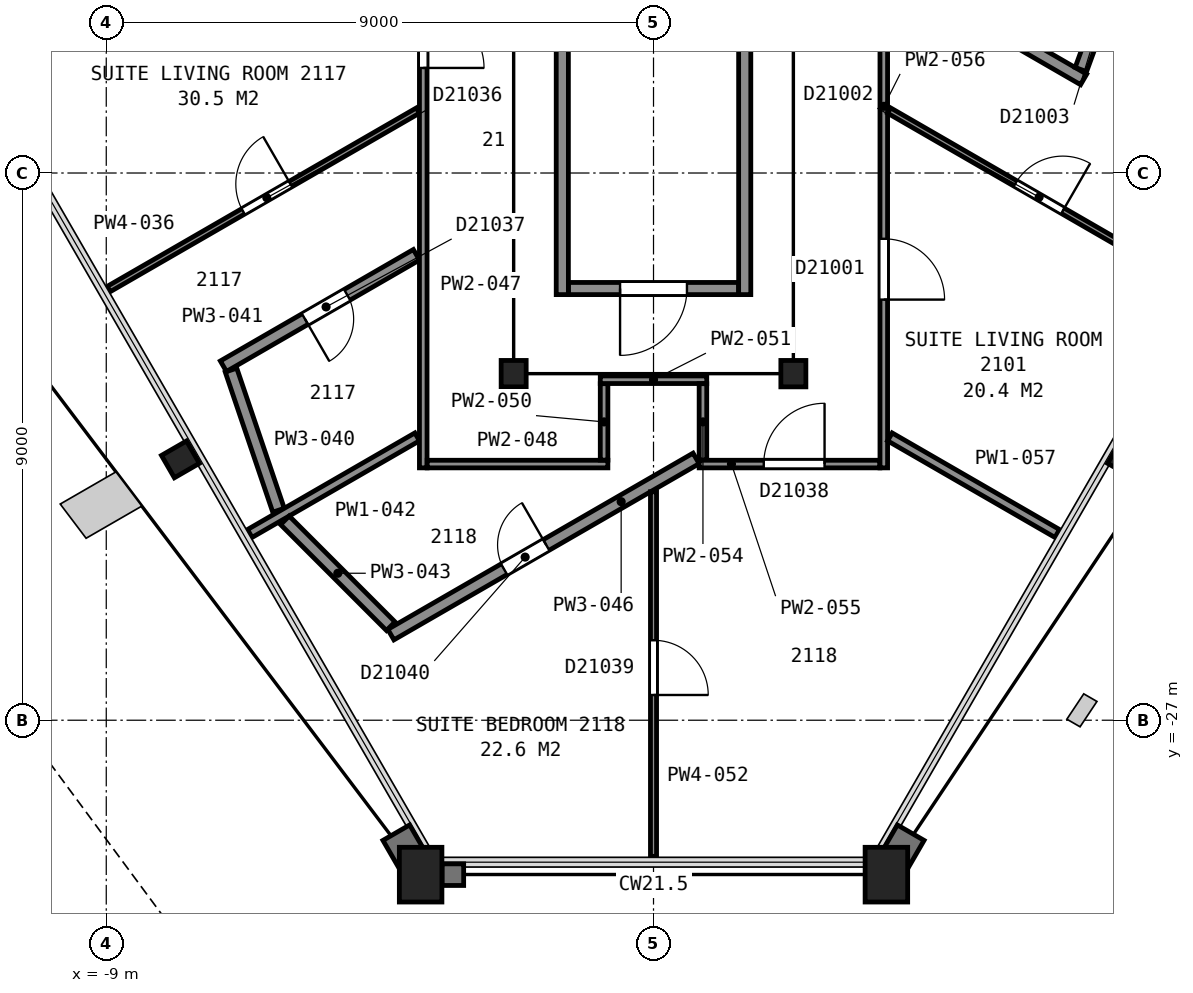
"""IFC4 building model, lengths in metres.
Left out: names, types, materials, properties, quantities, classifications, styles, units other than length and angle.
Written with IfcOpenShell. Run it as: python <this file> out.ifc"""

import sys

from ifc_helpers import new_model, si_unit, direction, frame, frame_2d, origin, origin_2d, place, context, subcontext, project, spatial, rectangle, hollow_rectangle, i_section, extrude, element, fill, save


model = new_model("IFC4")
c1 = context("Model", 3, precision=1e-05, world=origin(), true_north=direction((0.0, 1.0)))
c2 = subcontext(c1, "Body", "Model", "MODEL_VIEW")
j1 = project(units=[si_unit("LENGTHUNIT", "METRE"), si_unit("PLANEANGLEUNIT", "RADIAN")], contexts=[c1])
p1 = place(None, origin())
s1 = spatial("IfcSite", under=j1, at=p1, CompositionType="ELEMENT")
p2 = place(p1, origin())
s2 = spatial("IfcBuilding", under=s1, at=p2, CompositionType="ELEMENT")
p3 = place(p2, frame((0.0, 0.0, 92.8)))
s3 = spatial("IfcBuildingStorey", under=s2, at=p3, CompositionType="ELEMENT", Elevation=92.8)
p4 = place(p3, frame((-7.78, -22.71, 0.0), z_axis=(0.0, 0.0, 1.0), x_axis=(-0.5, 0.866025403784, 0.0)))
e1 = element("IfcColumn", 1, at=p4, inside=s3, PredefinedType="COLUMN", context=c2, shape_type="SweptSolid", body=[
    extrude(i_section(OverallWidth=0.424, OverallDepth=0.475, WebThickness=0.048, FlangeThickness=0.077, FilletRadius=0.015, at=origin_2d()), origin(), (0.0, 0.0, 1.0), 3.6),
])
for number, where, z_axis, x_axis in (
    (2, (-3.83, -29.54, 0.0), (0.0, 0.0, 1.0), (-1.0, 0.0, 0.0)),
    (3, (3.83, -29.54, 0.0), (0.0, 0.0, 1.0), (-1.0, 0.0, 0.0)),
):
    element("IfcColumn", number, at=place(p3, frame(where, z_axis=z_axis, x_axis=x_axis)), inside=s3, PredefinedType="COLUMN", context=c2, shape_type="SweptSolid", body=[
        extrude(hollow_rectangle(XDim=0.7, YDim=0.9, WallThickness=0.065, at=origin_2d()), origin(), (0.0, 0.0, 1.0), 3.6),
    ])
p5 = place(p3, frame((7.78, -22.71, 0.0), z_axis=(0.0, 0.0, 1.0), x_axis=(-0.5, -0.866025403784, 0.0)))
e4 = element("IfcColumn", 4, at=p5, inside=s3, PredefinedType="COLUMN", context=c2, shape_type="SweptSolid", body=[
    extrude(i_section(OverallWidth=0.424, OverallDepth=0.475, WebThickness=0.048, FlangeThickness=0.077, FilletRadius=0.015, at=origin_2d()), origin(), (0.0, 0.0, 1.0), 3.6),
])
for number, where, z_axis, x_axis in (
    (5, (-2.3, -21.3, 0.0), (0.0, 0.0, 1.0), (-1.0, 0.0, 0.0)),
    (6, (2.3, -21.3, 0.0), (0.0, 0.0, 1.0), (-1.0, 0.0, 0.0)),
):
    element("IfcColumn", number, at=place(p3, frame(where, z_axis=z_axis, x_axis=x_axis)), inside=s3, PredefinedType="COLUMN", context=c2, shape_type="SweptSolid", body=[
        extrude(i_section(OverallWidth=0.411, OverallDepth=0.434, WebThickness=0.036, FlangeThickness=0.057, FilletRadius=0.015, at=origin_2d()), origin(), (0.0, 0.0, 1.0), 3.6),
    ])
p6 = place(p3, frame((-1.4, -19.9, 0.0), z_axis=(0.0, 0.0, 1.0), x_axis=(1.0, 0.0, 0.0)))
e7 = element("IfcWall", 7, at=p6, inside=s3, PredefinedType="PARTITIONING", context=c2, shape_type="SweptSolid", body=[
    extrude(rectangle(XDim=2.8, YDim=0.2, at=frame_2d((1.4, 0.0))), origin(), (0.0, 0.0, 1.0), 3.35),
])
p7 = place(p6, frame((0.85, 0.0, 0.0)))
e8 = element("IfcOpeningElement", 8, at=p7, cuts=e7, PredefinedType="OPENING", context=c2, shape_type="SweptSolid", body=[
    extrude(rectangle(XDim=1.1, YDim=2.1, at=frame_2d((0.55, 1.05))), frame((0.0, 0.11, 0.0), z_axis=(0.0, -1.0, 0.0), x_axis=(1.0, 0.0, 0.0)), (0.0, 0.0, 1.0), 0.22),
])
for number, where, z_axis, x_axis in (
    (9, (1.5, -8.0, 0.0), (0.0, 0.0, 1.0), (0.0, -1.0, 0.0)),
    (10, (-1.5, -8.0, 0.0), (0.0, 0.0, 1.0), (0.0, -1.0, 0.0)),
):
    element("IfcWall", number, at=place(p3, frame(where, z_axis=z_axis, x_axis=x_axis)), inside=s3, PredefinedType="PARTITIONING", context=c2, shape_type="SweptSolid", body=[
        extrude(rectangle(XDim=12.0, YDim=0.2, at=frame_2d((6.0, 0.0))), origin(), (0.0, 0.0, 1.0), 3.35),
    ])
p8 = place(p3, frame((-3.875, -16.972, 0.0), z_axis=(0.0, 0.0, 1.0), x_axis=(-0.86602429061, -0.500001928069, 0.0)))
e11 = element("IfcWall", 11, at=p8, inside=s3, PredefinedType="PARTITIONING", context=c2, shape_type="SweptSolid", body=[
    extrude(rectangle(XDim=5.873, YDim=0.1, at=frame_2d((2.937, 0.0))), origin(), (0.0, 0.0, 1.0), 2.613),
])
p9 = place(p8, frame((2.419, 0.0, 0.0)))
e12 = element("IfcOpeningElement", 12, at=p9, cuts=e11, PredefinedType="OPENING", context=c2, shape_type="SweptSolid", body=[
    extrude(rectangle(XDim=0.9, YDim=2.1, at=frame_2d((0.45, 1.05))), frame((0.0, 0.06, 0.0), z_axis=(0.0, -1.0, 0.0), x_axis=(1.0, 0.0, 0.0)), (0.0, 0.0, 1.0), 0.12),
])
p10 = place(p3, frame((-6.948, -21.242, 0.0), z_axis=(0.0, 0.0, 1.0), x_axis=(0.321098754357, -0.947045716927, 0.0)))
e13 = element("IfcWall", 13, at=p10, inside=s3, PredefinedType="PARTITIONING", context=c2, shape_type="SweptSolid", body=[
    extrude(rectangle(XDim=2.434, YDim=0.2, at=frame_2d((1.217, 0.0))), origin(), (0.0, 0.0, 1.0), 2.613),
])
p11 = place(p3, frame((-3.899, -19.345, 0.0), z_axis=(0.0, 0.0, 1.0), x_axis=(-0.865971488458, -0.500093372459, 0.0)))
e14 = element("IfcWall", 14, at=p11, inside=s3, PredefinedType="PARTITIONING", context=c2, shape_type="SweptSolid", body=[
    extrude(rectangle(XDim=3.665, YDim=0.2, at=frame_2d((1.833, 0.0))), origin(), (0.0, 0.0, 1.0), 2.613),
])
p12 = place(p11, frame((1.315, 0.0, 0.0)))
e15 = element("IfcOpeningElement", 15, at=p12, cuts=e14, PredefinedType="OPENING", context=c2, shape_type="SweptSolid", body=[
    extrude(rectangle(XDim=0.8, YDim=2.1, at=frame_2d((0.4, 1.05))), frame((0.0, 0.11, 0.0), z_axis=(0.0, -1.0, 0.0), x_axis=(1.0, 0.0, 0.0)), (0.0, 0.0, 1.0), 0.22),
])
p13 = place(p3, frame((-6.64, -23.929, 0.0), z_axis=(0.0, 0.0, 1.0), x_axis=(0.866065365018, 0.499930778725, 0.0)))
e16 = element("IfcWall", 16, at=p13, inside=s3, PredefinedType="PARTITIONING", context=c2, shape_type="SweptSolid", body=[
    extrude(rectangle(XDim=3.179, YDim=0.15, at=frame_2d((1.589, 0.0))), origin(), (0.0, 0.0, 1.0), 2.613),
])
p14 = place(p3, frame((-6.062, -23.712, 0.0), z_axis=(0.0, 0.0, 1.0), x_axis=(0.706958057502, -0.707255473597, 0.0)))
e17 = element("IfcWall", 17, at=p14, inside=s3, PredefinedType="PARTITIONING", context=c2, shape_type="SweptSolid", body=[
    extrude(rectangle(XDim=2.463, YDim=0.2, at=frame_2d((1.231, 0.0))), origin(), (0.0, 0.0, 1.0), 2.613),
])
p15 = place(p3, frame((-4.32, -25.592, 0.0), z_axis=(0.0, 0.0, 1.0), x_axis=(0.86603408909, 0.499984956307, 0.0)))
e18 = element("IfcWall", 18, at=p15, inside=s3, PredefinedType="PARTITIONING", context=c2, shape_type="SweptSolid", body=[
    extrude(rectangle(XDim=5.797, YDim=0.2, at=frame_2d((2.898, 0.0))), origin(), (0.0, 0.0, 1.0), 2.613),
])
p16 = place(p15, frame((2.15, 0.0, 0.0)))
e19 = element("IfcOpeningElement", 19, at=p16, cuts=e18, PredefinedType="OPENING", context=c2, shape_type="SweptSolid", body=[
    extrude(rectangle(XDim=0.8, YDim=2.1, at=frame_2d((0.4, 1.05))), frame((0.0, 0.11, 0.0), z_axis=(0.0, -1.0, 0.0), x_axis=(1.0, 0.0, 0.0)), (0.0, 0.0, 1.0), 0.22),
])
p17 = place(p3, frame((-3.787, -22.85, 0.0), z_axis=(0.0, 0.0, 1.0), x_axis=(0.0, 1.0, 0.0)))
e20 = element("IfcWall", 20, at=p17, inside=s3, PredefinedType="PARTITIONING", context=c2, shape_type="SweptSolid", body=[
    extrude(rectangle(XDim=8.125, YDim=0.125, at=frame_2d((4.062, 0.0))), origin(), (0.0, 0.0, 1.0), 2.613),
])
p18 = place(p17, frame((6.577, 0.0, 0.0)))
e21 = element("IfcOpeningElement", 21, at=p18, cuts=e20, PredefinedType="OPENING", context=c2, shape_type="SweptSolid", body=[
    extrude(rectangle(XDim=1.0, YDim=2.1, at=frame_2d((0.5, 1.05))), frame((0.0, 0.073, 0.0), z_axis=(0.0, -1.0, 0.0), x_axis=(1.0, 0.0, 0.0)), (0.0, 0.0, 1.0), 0.145),
])
p19 = place(p3, frame((-3.722, -22.787, 0.0), z_axis=(0.0, 0.0, 1.0), x_axis=(1.0, 0.0, 0.0)))
e22 = element("IfcWall", 22, at=p19, inside=s3, PredefinedType="PARTITIONING", context=c2, shape_type="SweptSolid", body=[
    extrude(rectangle(XDim=2.971, YDim=0.125, at=frame_2d((1.486, 0.0))), origin(), (0.0, 0.0, 1.0), 2.613),
])
p20 = place(p3, frame((-0.813, -22.722, 0.0), z_axis=(0.0, 0.0, 1.0), x_axis=(0.0, 1.0, 0.0)))
e23 = element("IfcWall", 23, at=p20, inside=s3, PredefinedType="PARTITIONING", context=c2, shape_type="SweptSolid", body=[
    extrude(rectangle(XDim=1.257, YDim=0.125, at=frame_2d((0.628, 0.0))), origin(), (0.0, 0.0, 1.0), 2.613),
])
p21 = place(p3, frame((-0.875, -21.4, 0.0), z_axis=(0.0, 0.0, 1.0), x_axis=(1.0, 0.0, 0.0)))
e24 = element("IfcWall", 24, at=p21, inside=s3, PredefinedType="PARTITIONING", context=c2, shape_type="SweptSolid", body=[
    extrude(rectangle(XDim=1.751, YDim=0.125, at=frame_2d((0.875, 0.0))), origin(), (0.0, 0.0, 1.0), 2.613),
])
p22 = place(p3, frame((0.0, -29.239, 0.0), z_axis=(0.0, 0.0, 1.0), x_axis=(0.0, 1.0, 0.0)))
e25 = element("IfcWall", 25, at=p22, inside=s3, PredefinedType="PARTITIONING", context=c2, shape_type="SweptSolid", body=[
    extrude(rectangle(XDim=5.997, YDim=0.1, at=frame_2d((2.998, 0.0))), origin(), (0.0, 0.0, 1.0), 2.613),
])
p23 = place(p22, frame((2.654, 0.0, 0.0)))
e26 = element("IfcOpeningElement", 26, at=p23, cuts=e25, PredefinedType="OPENING", context=c2, shape_type="SweptSolid", body=[
    extrude(rectangle(XDim=0.9, YDim=2.1, at=frame_2d((0.45, 1.05))), frame((0.0, 0.06, 0.0), z_axis=(0.0, -1.0, 0.0), x_axis=(1.0, 0.0, 0.0)), (0.0, 0.0, 1.0), 0.12),
])
p24 = place(p3, frame((0.813, -22.722, 0.0), z_axis=(0.0, 0.0, 1.0), x_axis=(0.0, 1.0, 0.0)))
e27 = element("IfcWall", 27, at=p24, inside=s3, PredefinedType="PARTITIONING", context=c2, shape_type="SweptSolid", body=[
    extrude(rectangle(XDim=1.257, YDim=0.125, at=frame_2d((0.628, 0.0))), origin(), (0.0, 0.0, 1.0), 2.613),
])
p25 = place(p3, frame((3.722, -22.787, 0.0), z_axis=(0.0, 0.0, 1.0), x_axis=(-1.0, 0.0, 0.0)))
e28 = element("IfcWall", 28, at=p25, inside=s3, PredefinedType="PARTITIONING", context=c2, shape_type="SweptSolid", body=[
    extrude(rectangle(XDim=2.971, YDim=0.125, at=frame_2d((1.486, 0.0))), origin(), (0.0, 0.0, 1.0), 2.613),
])
p26 = place(p25, frame((0.909, 0.0, 0.0)))
e29 = element("IfcOpeningElement", 29, at=p26, cuts=e28, PredefinedType="OPENING", context=c2, shape_type="SweptSolid", body=[
    extrude(rectangle(XDim=1.0, YDim=2.1, at=frame_2d((0.5, 1.05))), frame((0.0, 0.073, 0.0), z_axis=(0.0, -1.0, 0.0), x_axis=(1.0, 0.0, 0.0)), (0.0, 0.0, 1.0), 0.145),
])
p27 = place(p3, frame((3.787, -14.725, 0.0), z_axis=(0.0, 0.0, 1.0), x_axis=(0.0, -1.0, 0.0)))
e30 = element("IfcWall", 30, at=p27, inside=s3, PredefinedType="PARTITIONING", context=c2, shape_type="SweptSolid", body=[
    extrude(rectangle(XDim=8.125, YDim=0.125, at=frame_2d((4.062, 0.0))), origin(), (0.0, 0.0, 1.0), 2.613),
])
p28 = place(p27, frame((4.357, 0.0, 0.0)))
e31 = element("IfcOpeningElement", 31, at=p28, cuts=e30, PredefinedType="OPENING", context=c2, shape_type="SweptSolid", body=[
    extrude(rectangle(XDim=1.0, YDim=2.1, at=frame_2d((0.5, 1.05))), frame((0.0, 0.073, 0.0), z_axis=(0.0, -1.0, 0.0), x_axis=(1.0, 0.0, 0.0)), (0.0, 0.0, 1.0), 0.145),
])
p29 = place(p3, frame((3.887, -22.34, 0.0), z_axis=(0.0, 0.0, 1.0), x_axis=(0.866065365018, -0.499930778725, 0.0)))
e32 = element("IfcWall", 32, at=p29, inside=s3, PredefinedType="PARTITIONING", context=c2, shape_type="SweptSolid", body=[
    extrude(rectangle(XDim=3.179, YDim=0.15, at=frame_2d((1.589, 0.0))), origin(), (0.0, 0.0, 1.0), 2.613),
])
p30 = place(p3, frame((3.875, -16.972, 0.0), z_axis=(0.0, 0.0, 1.0), x_axis=(0.86602429061, -0.500001928069, 0.0)))
e33 = element("IfcWall", 33, at=p30, inside=s3, PredefinedType="PARTITIONING", context=c2, shape_type="SweptSolid", body=[
    extrude(rectangle(XDim=5.873, YDim=0.1, at=frame_2d((2.937, 0.0))), origin(), (0.0, 0.0, 1.0), 2.613),
])
p31 = place(p30, frame((2.399, 0.0, 0.0)))
e34 = element("IfcOpeningElement", 34, at=p31, cuts=e33, PredefinedType="OPENING", context=c2, shape_type="SweptSolid", body=[
    extrude(rectangle(XDim=0.9, YDim=2.1, at=frame_2d((0.45, 1.05))), frame((0.0, 0.06, 0.0), z_axis=(0.0, -1.0, 0.0), x_axis=(1.0, 0.0, 0.0)), (0.0, 0.0, 1.0), 0.12),
])
p32 = place(p3, frame((3.875, -14.613, 0.0), z_axis=(0.0, 0.0, 1.0), x_axis=(0.865890522866, -0.500233547866, 0.0)))
e35 = element("IfcWall", 35, at=p32, inside=s3, PredefinedType="PARTITIONING", context=c2, shape_type="SweptSolid", body=[
    extrude(rectangle(XDim=3.694, YDim=0.2, at=frame_2d((1.847, 0.0))), origin(), (0.0, 0.0, 1.0), 2.613),
])
p33 = place(p3, frame((7.028, -16.298, 0.0), z_axis=(0.0, 0.0, 1.0), x_axis=(0.342817359533, 0.939402074728, 0.0)))
e36 = element("IfcWall", 36, at=p33, inside=s3, PredefinedType="PARTITIONING", context=c2, shape_type="SweptSolid", body=[
    extrude(rectangle(XDim=2.426, YDim=0.2, at=frame_2d((1.213, 0.0))), origin(), (0.0, 0.0, 1.0), 2.613),
])
p34 = place(p33, frame((0.78, 0.0, 0.0)))
e37 = element("IfcOpeningElement", 37, at=p34, cuts=e36, PredefinedType="OPENING", context=c2, shape_type="SweptSolid", body=[
    extrude(rectangle(XDim=0.8, YDim=2.1, at=frame_2d((0.4, 1.05))), frame((0.0, 0.11, 0.0), z_axis=(0.0, -1.0, 0.0), x_axis=(1.0, 0.0, 0.0)), (0.0, 0.0, 1.0), 0.22),
])
p35 = place(p7, origin())
e38 = element("IfcDoor", 38, at=p35, inside=s3, OperationType="SINGLE_SWING_LEFT", PredefinedType="DOOR", context=c2, shape_type="SweptSolid", body=[
    extrude(rectangle(XDim=1.1, YDim=2.1, at=frame_2d((0.55, 1.05))), frame((0.0, 0.025, 0.0), z_axis=(0.0, -1.0, 0.0), x_axis=(1.0, 0.0, 0.0)), (0.0, 0.0, 1.0), 0.05),
])
fill(e8, e38)
p36 = place(p9, origin())
e39 = element("IfcDoor", 39, at=p36, inside=s3, OperationType="SINGLE_SWING_LEFT", PredefinedType="DOOR", context=c2, shape_type="SweptSolid", body=[
    extrude(rectangle(XDim=0.9, YDim=2.1, at=frame_2d((0.45, 1.05))), frame((0.0, 0.025, 0.0), z_axis=(0.0, -1.0, 0.0), x_axis=(1.0, 0.0, 0.0)), (0.0, 0.0, 1.0), 0.05),
])
fill(e12, e39)
p37 = place(p12, origin())
e40 = element("IfcDoor", 40, at=p37, inside=s3, OperationType="SINGLE_SWING_RIGHT", PredefinedType="DOOR", context=c2, shape_type="SweptSolid", body=[
    extrude(rectangle(XDim=0.8, YDim=2.1, at=frame_2d((0.4, 1.05))), frame((0.0, 0.025, 0.0), z_axis=(0.0, -1.0, 0.0), x_axis=(1.0, 0.0, 0.0)), (0.0, 0.0, 1.0), 0.05),
])
fill(e15, e40)
p38 = place(p16, origin())
e41 = element("IfcDoor", 41, at=p38, inside=s3, OperationType="SINGLE_SWING_RIGHT", PredefinedType="DOOR", context=c2, shape_type="SweptSolid", body=[
    extrude(rectangle(XDim=0.8, YDim=2.1, at=frame_2d((0.4, 1.05))), frame((0.0, 0.025, 0.0), z_axis=(0.0, -1.0, 0.0), x_axis=(1.0, 0.0, 0.0)), (0.0, 0.0, 1.0), 0.05),
])
fill(e19, e41)
p39 = place(p18, origin())
e42 = element("IfcDoor", 42, at=p39, inside=s3, OperationType="SINGLE_SWING_LEFT", PredefinedType="DOOR", context=c2, shape_type="SweptSolid", body=[
    extrude(rectangle(XDim=1.0, YDim=2.1, at=frame_2d((0.5, 1.05))), frame((0.0, 0.025, 0.0), z_axis=(0.0, -1.0, 0.0), x_axis=(1.0, 0.0, 0.0)), (0.0, 0.0, 1.0), 0.05),
])
fill(e21, e42)
p40 = place(p23, origin())
e43 = element("IfcDoor", 43, at=p40, inside=s3, OperationType="SINGLE_SWING_LEFT", PredefinedType="DOOR", context=c2, shape_type="SweptSolid", body=[
    extrude(rectangle(XDim=0.9, YDim=2.1, at=frame_2d((0.45, 1.05))), frame((0.0, 0.025, 0.0), z_axis=(0.0, -1.0, 0.0), x_axis=(1.0, 0.0, 0.0)), (0.0, 0.0, 1.0), 0.05),
])
fill(e26, e43)
p41 = place(p26, origin())
e44 = element("IfcDoor", 44, at=p41, inside=s3, OperationType="SINGLE_SWING_LEFT", PredefinedType="DOOR", context=c2, shape_type="SweptSolid", body=[
    extrude(rectangle(XDim=1.0, YDim=2.1, at=frame_2d((0.5, 1.05))), frame((0.0, 0.025, 0.0), z_axis=(0.0, -1.0, 0.0), x_axis=(1.0, 0.0, 0.0)), (0.0, 0.0, 1.0), 0.05),
])
fill(e29, e44)
p42 = place(p28, origin())
e45 = element("IfcDoor", 45, at=p42, inside=s3, OperationType="SINGLE_SWING_RIGHT", PredefinedType="DOOR", context=c2, shape_type="SweptSolid", body=[
    extrude(rectangle(XDim=1.0, YDim=2.1, at=frame_2d((0.5, 1.05))), frame((0.0, 0.025, 0.0), z_axis=(0.0, -1.0, 0.0), x_axis=(1.0, 0.0, 0.0)), (0.0, 0.0, 1.0), 0.05),
])
fill(e31, e45)
p43 = place(p31, origin())
e46 = element("IfcDoor", 46, at=p43, inside=s3, OperationType="SINGLE_SWING_RIGHT", PredefinedType="DOOR", context=c2, shape_type="SweptSolid", body=[
    extrude(rectangle(XDim=0.9, YDim=2.1, at=frame_2d((0.45, 1.05))), frame((0.0, 0.025, 0.0), z_axis=(0.0, -1.0, 0.0), x_axis=(1.0, 0.0, 0.0)), (0.0, 0.0, 1.0), 0.05),
])
fill(e34, e46)
save(model, sys.argv[1])
